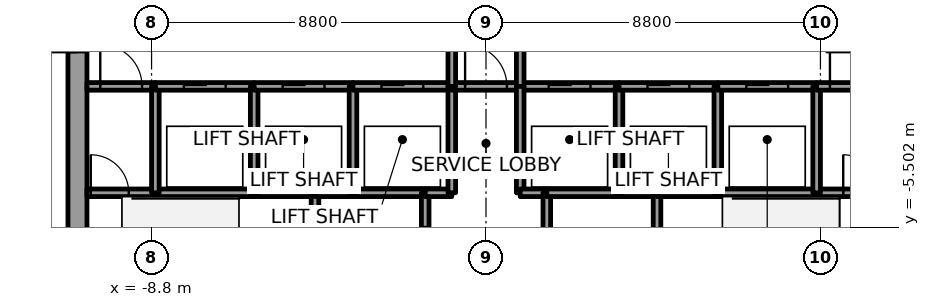
"""IFC4 building model, lengths in metres.
Left out: names, types, materials, properties, quantities, classifications, styles, units other than length and angle.
Written with IfcOpenShell. Run it as: python <this file> out.ifc"""

import sys

from ifc_helpers import new_model, si_unit, direction, frame, frame_2d, origin, place, context, subcontext, project, spatial, rectangle, extrude, element, fill, save


model = new_model("IFC4")
c1 = context("Model", 3, precision=1e-05, world=origin(), true_north=direction((0.0, 1.0)))
c2 = subcontext(c1, "Body", "Model", "MODEL_VIEW")
j1 = project(units=[si_unit("LENGTHUNIT", "METRE"), si_unit("PLANEANGLEUNIT", "RADIAN")], contexts=[c1])
p1 = place(None, origin())
s1 = spatial("IfcSite", under=j1, at=p1, CompositionType="ELEMENT")
p2 = place(p1, origin())
s2 = spatial("IfcBuilding", under=s1, at=p2, CompositionType="ELEMENT")
p3 = place(p2, frame((0.0, 0.0, 92.4)))
s3 = spatial("IfcBuildingStorey", under=s2, at=p3, CompositionType="ELEMENT", Elevation=92.4)
p4 = place(p3, frame((-10.75, -7.5, 0.0), z_axis=(0.0, 0.0, 1.0), x_axis=(0.0, 1.0, 0.0)))
e1 = element("IfcWall", 1, at=p4, inside=s3, PredefinedType="SHEAR", context=c2, shape_type="SweptSolid", body=[
    extrude(rectangle(XDim=15.0, YDim=0.5, at=frame_2d((7.5, 0.0))), origin(), (0.0, 0.0, 1.0), 3.7),
])
p5 = place(p4, frame((6.6, 0.0, 0.0)))
e2 = element("IfcOpeningElement", 2, at=p5, cuts=e1, PredefinedType="OPENING", context=c2, shape_type="SweptSolid", body=[
    extrude(rectangle(XDim=1.8, YDim=2.1, at=frame_2d((0.9, 1.05))), frame((0.0, 0.25, 0.0), z_axis=(0.0, -1.0, 0.0), x_axis=(1.0, 0.0, 0.0)), (0.0, 0.0, 1.0), 0.5),
])
p6 = place(p3, frame((-10.5, -4.6, 0.0), z_axis=(0.0, 0.0, 1.0), x_axis=(1.0, 0.0, 0.0)))
e3 = element("IfcWall", 3, at=p6, inside=s3, PredefinedType="SOLIDWALL", context=c2, shape_type="SweptSolid", body=[
    extrude(rectangle(XDim=1.8, YDim=0.2, at=frame_2d((0.9, 0.0))), origin(), (0.0, 0.0, 1.0), 3.55),
])
p7 = place(p6, frame((0.1, 0.0, 0.0)))
e4 = element("IfcOpeningElement", 4, at=p7, cuts=e3, PredefinedType="OPENING", context=c2, shape_type="SweptSolid", body=[
    extrude(rectangle(XDim=1.0, YDim=2.1, at=frame_2d((0.5, 1.05))), frame((0.0, 0.1, 0.0), z_axis=(0.0, -1.0, 0.0), x_axis=(1.0, 0.0, 0.0)), (0.0, 0.0, 1.0), 0.2),
])
p8 = place(p3, frame((-10.5, -1.8, 0.0), z_axis=(0.0, 0.0, 1.0), x_axis=(1.0, 0.0, 0.0)))
e5 = element("IfcWall", 5, at=p8, inside=s3, PredefinedType="SOLIDWALL", context=c2, shape_type="SweptSolid", body=[
    extrude(rectangle(XDim=1.8, YDim=0.2, at=frame_2d((0.9, 0.0))), origin(), (0.0, 0.0, 1.0), 3.55),
])
p9 = place(p8, frame((0.35, 0.0, 0.0)))
e6 = element("IfcOpeningElement", 6, at=p9, cuts=e5, PredefinedType="OPENING", context=c2, shape_type="SweptSolid", body=[
    extrude(rectangle(XDim=1.1, YDim=2.1, at=frame_2d((0.55, 1.05))), frame((0.0, 0.1, 0.0), z_axis=(0.0, -1.0, 0.0), x_axis=(1.0, 0.0, 0.0)), (0.0, 0.0, 1.0), 0.2),
])
p10 = place(p3, frame((-8.7, -4.6, 0.0), z_axis=(0.0, 0.0, 1.0), x_axis=(1.0, 0.0, 0.0)))
e7 = element("IfcWall", 7, at=p10, inside=s3, PredefinedType="SOLIDWALL", context=c2, shape_type="SweptSolid", body=[
    extrude(rectangle(XDim=2.6, YDim=0.2, at=frame_2d((1.3, 0.0))), origin(), (0.0, 0.0, 1.0), 3.55),
])
p11 = place(p3, frame((-8.7, -4.6, 0.0), z_axis=(0.0, 0.0, 1.0), x_axis=(0.0, 1.0, 0.0)))
e8 = element("IfcWall", 8, at=p11, inside=s3, PredefinedType="SOLIDWALL", context=c2, shape_type="SweptSolid", body=[
    extrude(rectangle(XDim=2.8, YDim=0.2, at=frame_2d((1.4, 0.0))), origin(), (0.0, 0.0, 1.0), 3.55),
])
p12 = place(p3, frame((-8.7, -1.8, 0.0), z_axis=(0.0, 0.0, 1.0), x_axis=(1.0, 0.0, 0.0)))
e9 = element("IfcWall", 9, at=p12, inside=s3, PredefinedType="SOLIDWALL", context=c2, shape_type="SweptSolid", body=[
    extrude(rectangle(XDim=2.6, YDim=0.2, at=frame_2d((1.3, 0.0))), origin(), (0.0, 0.0, 1.0), 3.55),
])
p13 = place(p12, frame((0.75, 0.0, 0.0)))
e10 = element("IfcOpeningElement", 10, at=p13, cuts=e9, PredefinedType="OPENING", context=c2, shape_type="SweptSolid", body=[
    extrude(rectangle(XDim=1.1, YDim=2.1, at=frame_2d((0.55, 1.05))), frame((0.0, 0.1, 0.0), z_axis=(0.0, -1.0, 0.0), x_axis=(1.0, 0.0, 0.0)), (0.0, 0.0, 1.0), 0.2),
])
p14 = place(p3, frame((-6.1, -4.6, 0.0), z_axis=(0.0, 0.0, 1.0), x_axis=(1.0, 0.0, 0.0)))
e11 = element("IfcWall", 11, at=p14, inside=s3, PredefinedType="SOLIDWALL", context=c2, shape_type="SweptSolid", body=[
    extrude(rectangle(XDim=1.6, YDim=0.2, at=frame_2d((0.8, 0.0))), origin(), (0.0, 0.0, 1.0), 3.55),
])
p15 = place(p3, frame((-6.1, -4.6, 0.0), z_axis=(0.0, 0.0, 1.0), x_axis=(0.0, 1.0, 0.0)))
e12 = element("IfcWall", 12, at=p15, inside=s3, PredefinedType="SOLIDWALL", context=c2, shape_type="SweptSolid", body=[
    extrude(rectangle(XDim=2.8, YDim=0.2, at=frame_2d((1.4, 0.0))), origin(), (0.0, 0.0, 1.0), 3.55),
])
p16 = place(p3, frame((-6.1, -1.8, 0.0), z_axis=(0.0, 0.0, 1.0), x_axis=(1.0, 0.0, 0.0)))
e13 = element("IfcWall", 13, at=p16, inside=s3, PredefinedType="SOLIDWALL", context=c2, shape_type="SweptSolid", body=[
    extrude(rectangle(XDim=2.6, YDim=0.2, at=frame_2d((1.3, 0.0))), origin(), (0.0, 0.0, 1.0), 3.55),
])
p17 = place(p16, frame((0.75, 0.0, 0.0)))
e14 = element("IfcOpeningElement", 14, at=p17, cuts=e13, PredefinedType="OPENING", context=c2, shape_type="SweptSolid", body=[
    extrude(rectangle(XDim=1.1, YDim=2.1, at=frame_2d((0.55, 1.05))), frame((0.0, 0.1, 0.0), z_axis=(0.0, -1.0, 0.0), x_axis=(1.0, 0.0, 0.0)), (0.0, 0.0, 1.0), 0.2),
])
p18 = place(p3, frame((-4.5, -4.6, 0.0), z_axis=(0.0, 0.0, 1.0), x_axis=(0.0, -1.0, 0.0)))
e15 = element("IfcWall", 15, at=p18, inside=s3, PredefinedType="SOLIDWALL", context=c2, shape_type="SweptSolid", body=[
    extrude(rectangle(XDim=2.9, YDim=0.2, at=frame_2d((1.45, 0.0))), origin(), (0.0, 0.0, 1.0), 3.55),
])
p19 = place(p3, frame((-4.5, -4.6, 0.0), z_axis=(0.0, 0.0, 1.0), x_axis=(1.0, 0.0, 0.0)))
e16 = element("IfcWall", 16, at=p19, inside=s3, PredefinedType="SOLIDWALL", context=c2, shape_type="SweptSolid", body=[
    extrude(rectangle(XDim=1.0, YDim=0.2, at=frame_2d((0.5, 0.0))), origin(), (0.0, 0.0, 1.0), 3.55),
])
p20 = place(p3, frame((-3.5, -4.6, 0.0), z_axis=(0.0, 0.0, 1.0), x_axis=(1.0, 0.0, 0.0)))
e17 = element("IfcWall", 17, at=p20, inside=s3, PredefinedType="SOLIDWALL", context=c2, shape_type="SweptSolid", body=[
    extrude(rectangle(XDim=1.9, YDim=0.2, at=frame_2d((0.95, 0.0))), origin(), (0.0, 0.0, 1.0), 3.55),
])
p21 = place(p3, frame((-3.5, -4.6, 0.0), z_axis=(0.0, 0.0, 1.0), x_axis=(0.0, 1.0, 0.0)))
e18 = element("IfcWall", 18, at=p21, inside=s3, PredefinedType="SOLIDWALL", context=c2, shape_type="SweptSolid", body=[
    extrude(rectangle(XDim=2.8, YDim=0.2, at=frame_2d((1.4, 0.0))), origin(), (0.0, 0.0, 1.0), 3.55),
])
p22 = place(p3, frame((-3.5, -1.8, 0.0), z_axis=(0.0, 0.0, 1.0), x_axis=(1.0, 0.0, 0.0)))
e19 = element("IfcWall", 19, at=p22, inside=s3, PredefinedType="SOLIDWALL", context=c2, shape_type="SweptSolid", body=[
    extrude(rectangle(XDim=2.6, YDim=0.2, at=frame_2d((1.3, 0.0))), origin(), (0.0, 0.0, 1.0), 3.55),
])
p23 = place(p22, frame((0.75, 0.0, 0.0)))
e20 = element("IfcOpeningElement", 20, at=p23, cuts=e19, PredefinedType="OPENING", context=c2, shape_type="SweptSolid", body=[
    extrude(rectangle(XDim=1.1, YDim=2.1, at=frame_2d((0.55, 1.05))), frame((0.0, 0.1, 0.0), z_axis=(0.0, -1.0, 0.0), x_axis=(1.0, 0.0, 0.0)), (0.0, 0.0, 1.0), 0.2),
])
p24 = place(p3, frame((-1.6, -7.5, 0.0), z_axis=(0.0, 0.0, 1.0), x_axis=(0.0, 1.0, 0.0)))
e21 = element("IfcWall", 21, at=p24, inside=s3, PredefinedType="SOLIDWALL", context=c2, shape_type="SweptSolid", body=[
    extrude(rectangle(XDim=2.9, YDim=0.2, at=frame_2d((1.45, 0.0))), origin(), (0.0, 0.0, 1.0), 3.55),
])
p25 = place(p24, frame((0.9, 0.0, 0.0)))
e22 = element("IfcOpeningElement", 22, at=p25, cuts=e21, PredefinedType="OPENING", context=c2, shape_type="SweptSolid", body=[
    extrude(rectangle(XDim=1.1, YDim=2.1, at=frame_2d((0.55, 1.05))), frame((0.0, 0.1, 0.0), z_axis=(0.0, -1.0, 0.0), x_axis=(1.0, 0.0, 0.0)), (0.0, 0.0, 1.0), 0.2),
])
p26 = place(p3, frame((-1.6, -4.6, 0.0), z_axis=(0.0, 0.0, 1.0), x_axis=(1.0, 0.0, 0.0)))
e23 = element("IfcWall", 23, at=p26, inside=s3, PredefinedType="SOLIDWALL", context=c2, shape_type="SweptSolid", body=[
    extrude(rectangle(XDim=0.7, YDim=0.2, at=frame_2d((0.35, 0.0))), origin(), (0.0, 0.0, 1.0), 3.55),
])
p27 = place(p3, frame((-0.9, -4.6, 0.0), z_axis=(0.0, 0.0, 1.0), x_axis=(0.0, 1.0, 0.0)))
e24 = element("IfcWall", 24, at=p27, inside=s3, PredefinedType="SOLIDWALL", context=c2, shape_type="SweptSolid", body=[
    extrude(rectangle(XDim=2.8, YDim=0.2, at=frame_2d((1.4, 0.0))), origin(), (0.0, 0.0, 1.0), 3.55),
])
p28 = place(p3, frame((-0.9, -1.8, 0.0), z_axis=(0.0, 0.0, 1.0), x_axis=(1.0, 0.0, 0.0)))
e25 = element("IfcWall", 25, at=p28, inside=s3, PredefinedType="SOLIDWALL", context=c2, shape_type="SweptSolid", body=[
    extrude(rectangle(XDim=1.8, YDim=0.2, at=frame_2d((0.9, 0.0))), origin(), (0.0, 0.0, 1.0), 3.55),
])
p29 = place(p28, frame((0.35, 0.0, 0.0)))
e26 = element("IfcOpeningElement", 26, at=p29, cuts=e25, PredefinedType="OPENING", context=c2, shape_type="SweptSolid", body=[
    extrude(rectangle(XDim=1.1, YDim=2.1, at=frame_2d((0.55, 1.05))), frame((0.0, 0.1, 0.0), z_axis=(0.0, -1.0, 0.0), x_axis=(1.0, 0.0, 0.0)), (0.0, 0.0, 1.0), 0.2),
])
p30 = place(p3, frame((-0.9, 1.8, 0.0), z_axis=(0.0, 0.0, 1.0), x_axis=(0.0, -1.0, 0.0)))
e27 = element("IfcWall", 27, at=p30, inside=s3, PredefinedType="SOLIDWALL", context=c2, shape_type="SweptSolid", body=[
    extrude(rectangle(XDim=3.6, YDim=0.2, at=frame_2d((1.8, 0.0))), origin(), (0.0, 0.0, 1.0), 3.55),
])
p31 = place(p30, frame((1.05, 0.0, 0.0)))
e28 = element("IfcOpeningElement", 28, at=p31, cuts=e27, PredefinedType="OPENING", context=c2, shape_type="SweptSolid", body=[
    extrude(rectangle(XDim=1.5, YDim=2.1, at=frame_2d((0.75, 1.05))), frame((0.0, 0.1, 0.0), z_axis=(0.0, -1.0, 0.0), x_axis=(1.0, 0.0, 0.0)), (0.0, 0.0, 1.0), 0.2),
])
p32 = place(p3, frame((0.9, -1.8, 0.0), z_axis=(0.0, 0.0, 1.0), x_axis=(1.0, 0.0, 0.0)))
e29 = element("IfcWall", 29, at=p32, inside=s3, PredefinedType="SOLIDWALL", context=c2, shape_type="SweptSolid", body=[
    extrude(rectangle(XDim=2.6, YDim=0.2, at=frame_2d((1.3, 0.0))), origin(), (0.0, 0.0, 1.0), 3.55),
])
p33 = place(p32, frame((0.75, 0.0, 0.0)))
e30 = element("IfcOpeningElement", 30, at=p33, cuts=e29, PredefinedType="OPENING", context=c2, shape_type="SweptSolid", body=[
    extrude(rectangle(XDim=1.1, YDim=2.1, at=frame_2d((0.55, 1.05))), frame((0.0, 0.1, 0.0), z_axis=(0.0, -1.0, 0.0), x_axis=(1.0, 0.0, 0.0)), (0.0, 0.0, 1.0), 0.2),
])
p34 = place(p3, frame((0.9, -1.8, 0.0), z_axis=(0.0, 0.0, 1.0), x_axis=(0.0, 1.0, 0.0)))
e31 = element("IfcWall", 31, at=p34, inside=s3, PredefinedType="SOLIDWALL", context=c2, shape_type="SweptSolid", body=[
    extrude(rectangle(XDim=3.6, YDim=0.2, at=frame_2d((1.8, 0.0))), origin(), (0.0, 0.0, 1.0), 3.55),
])
p35 = place(p34, frame((1.05, 0.0, 0.0)))
e32 = element("IfcOpeningElement", 32, at=p35, cuts=e31, PredefinedType="OPENING", context=c2, shape_type="SweptSolid", body=[
    extrude(rectangle(XDim=1.5, YDim=2.1, at=frame_2d((0.75, 1.05))), frame((0.0, 0.1, 0.0), z_axis=(0.0, -1.0, 0.0), x_axis=(1.0, 0.0, 0.0)), (0.0, 0.0, 1.0), 0.2),
])
p36 = place(p3, frame((0.9, -1.8, 0.0), z_axis=(0.0, 0.0, 1.0), x_axis=(0.0, -1.0, 0.0)))
e33 = element("IfcWall", 33, at=p36, inside=s3, PredefinedType="SOLIDWALL", context=c2, shape_type="SweptSolid", body=[
    extrude(rectangle(XDim=2.8, YDim=0.2, at=frame_2d((1.4, 0.0))), origin(), (0.0, 0.0, 1.0), 3.55),
])
p37 = place(p3, frame((0.9, -4.6, 0.0), z_axis=(0.0, 0.0, 1.0), x_axis=(1.0, 0.0, 0.0)))
e34 = element("IfcWall", 34, at=p37, inside=s3, PredefinedType="SOLIDWALL", context=c2, shape_type="SweptSolid", body=[
    extrude(rectangle(XDim=0.7, YDim=0.2, at=frame_2d((0.35, 0.0))), origin(), (0.0, 0.0, 1.0), 3.55),
])
p38 = place(p3, frame((1.6, -4.6, 0.0), z_axis=(0.0, 0.0, 1.0), x_axis=(0.0, -1.0, 0.0)))
e35 = element("IfcWall", 35, at=p38, inside=s3, PredefinedType="SOLIDWALL", context=c2, shape_type="SweptSolid", body=[
    extrude(rectangle(XDim=2.9, YDim=0.2, at=frame_2d((1.45, 0.0))), origin(), (0.0, 0.0, 1.0), 3.55),
])
p39 = place(p38, frame((1.0, 0.0, 0.0)))
e36 = element("IfcOpeningElement", 36, at=p39, cuts=e35, PredefinedType="OPENING", context=c2, shape_type="SweptSolid", body=[
    extrude(rectangle(XDim=0.9, YDim=2.1, at=frame_2d((0.45, 1.05))), frame((0.0, 0.1, 0.0), z_axis=(0.0, -1.0, 0.0), x_axis=(1.0, 0.0, 0.0)), (0.0, 0.0, 1.0), 0.2),
])
p40 = place(p3, frame((3.5, -4.6, 0.0), z_axis=(0.0, 0.0, 1.0), x_axis=(-1.0, 0.0, 0.0)))
e37 = element("IfcWall", 37, at=p40, inside=s3, PredefinedType="SOLIDWALL", context=c2, shape_type="SweptSolid", body=[
    extrude(rectangle(XDim=1.9, YDim=0.2, at=frame_2d((0.95, 0.0))), origin(), (0.0, 0.0, 1.0), 3.55),
])
p41 = place(p3, frame((4.5, -4.6, 0.0), z_axis=(0.0, 0.0, 1.0), x_axis=(-1.0, 0.0, 0.0)))
e38 = element("IfcWall", 38, at=p41, inside=s3, PredefinedType="SOLIDWALL", context=c2, shape_type="SweptSolid", body=[
    extrude(rectangle(XDim=1.0, YDim=0.2, at=frame_2d((0.5, 0.0))), origin(), (0.0, 0.0, 1.0), 3.55),
])
p42 = place(p3, frame((3.5, -4.6, 0.0), z_axis=(0.0, 0.0, 1.0), x_axis=(0.0, 1.0, 0.0)))
e39 = element("IfcWall", 39, at=p42, inside=s3, PredefinedType="SOLIDWALL", context=c2, shape_type="SweptSolid", body=[
    extrude(rectangle(XDim=2.8, YDim=0.2, at=frame_2d((1.4, 0.0))), origin(), (0.0, 0.0, 1.0), 3.55),
])
p43 = place(p3, frame((3.5, -1.8, 0.0), z_axis=(0.0, 0.0, 1.0), x_axis=(1.0, 0.0, 0.0)))
e40 = element("IfcWall", 40, at=p43, inside=s3, PredefinedType="SOLIDWALL", context=c2, shape_type="SweptSolid", body=[
    extrude(rectangle(XDim=2.6, YDim=0.2, at=frame_2d((1.3, 0.0))), origin(), (0.0, 0.0, 1.0), 3.55),
])
p44 = place(p43, frame((0.75, 0.0, 0.0)))
e41 = element("IfcOpeningElement", 41, at=p44, cuts=e40, PredefinedType="OPENING", context=c2, shape_type="SweptSolid", body=[
    extrude(rectangle(XDim=1.1, YDim=2.1, at=frame_2d((0.55, 1.05))), frame((0.0, 0.1, 0.0), z_axis=(0.0, -1.0, 0.0), x_axis=(1.0, 0.0, 0.0)), (0.0, 0.0, 1.0), 0.2),
])
p45 = place(p3, frame((4.5, -7.5, 0.0), z_axis=(0.0, 0.0, 1.0), x_axis=(0.0, 1.0, 0.0)))
e42 = element("IfcWall", 42, at=p45, inside=s3, PredefinedType="SOLIDWALL", context=c2, shape_type="SweptSolid", body=[
    extrude(rectangle(XDim=2.9, YDim=0.2, at=frame_2d((1.45, 0.0))), origin(), (0.0, 0.0, 1.0), 3.55),
])
p46 = place(p3, frame((4.5, -4.6, 0.0), z_axis=(0.0, 0.0, 1.0), x_axis=(1.0, 0.0, 0.0)))
e43 = element("IfcWall", 43, at=p46, inside=s3, PredefinedType="SOLIDWALL", context=c2, shape_type="SweptSolid", body=[
    extrude(rectangle(XDim=1.6, YDim=0.2, at=frame_2d((0.8, 0.0))), origin(), (0.0, 0.0, 1.0), 3.55),
])
p47 = place(p3, frame((6.1, -4.6, 0.0), z_axis=(0.0, 0.0, 1.0), x_axis=(1.0, 0.0, 0.0)))
e44 = element("IfcWall", 44, at=p47, inside=s3, PredefinedType="SOLIDWALL", context=c2, shape_type="SweptSolid", body=[
    extrude(rectangle(XDim=2.6, YDim=0.2, at=frame_2d((1.3, 0.0))), origin(), (0.0, 0.0, 1.0), 3.55),
])
p48 = place(p3, frame((6.1, -4.6, 0.0), z_axis=(0.0, 0.0, 1.0), x_axis=(0.0, 1.0, 0.0)))
e45 = element("IfcWall", 45, at=p48, inside=s3, PredefinedType="SOLIDWALL", context=c2, shape_type="SweptSolid", body=[
    extrude(rectangle(XDim=2.8, YDim=0.2, at=frame_2d((1.4, 0.0))), origin(), (0.0, 0.0, 1.0), 3.55),
])
p49 = place(p3, frame((6.1, -1.8, 0.0), z_axis=(0.0, 0.0, 1.0), x_axis=(1.0, 0.0, 0.0)))
e46 = element("IfcWall", 46, at=p49, inside=s3, PredefinedType="SOLIDWALL", context=c2, shape_type="SweptSolid", body=[
    extrude(rectangle(XDim=2.6, YDim=0.2, at=frame_2d((1.3, 0.0))), origin(), (0.0, 0.0, 1.0), 3.55),
])
p50 = place(p49, frame((0.75, 0.0, 0.0)))
e47 = element("IfcOpeningElement", 47, at=p50, cuts=e46, PredefinedType="OPENING", context=c2, shape_type="SweptSolid", body=[
    extrude(rectangle(XDim=1.1, YDim=2.1, at=frame_2d((0.55, 1.05))), frame((0.0, 0.1, 0.0), z_axis=(0.0, -1.0, 0.0), x_axis=(1.0, 0.0, 0.0)), (0.0, 0.0, 1.0), 0.2),
])
p51 = place(p3, frame((8.7, -4.6, 0.0), z_axis=(0.0, 0.0, 1.0), x_axis=(1.0, 0.0, 0.0)))
e48 = element("IfcWall", 48, at=p51, inside=s3, PredefinedType="SOLIDWALL", context=c2, shape_type="SweptSolid", body=[
    extrude(rectangle(XDim=1.8, YDim=0.2, at=frame_2d((0.9, 0.0))), origin(), (0.0, 0.0, 1.0), 3.55),
])
p52 = place(p51, frame((0.7, 0.0, 0.0)))
e49 = element("IfcOpeningElement", 49, at=p52, cuts=e48, PredefinedType="OPENING", context=c2, shape_type="SweptSolid", body=[
    extrude(rectangle(XDim=1.0, YDim=2.1, at=frame_2d((0.5, 1.05))), frame((0.0, 0.1, 0.0), z_axis=(0.0, -1.0, 0.0), x_axis=(1.0, 0.0, 0.0)), (0.0, 0.0, 1.0), 0.2),
])
p53 = place(p3, frame((8.7, -1.8, 0.0), z_axis=(0.0, 0.0, 1.0), x_axis=(0.0, -1.0, 0.0)))
e50 = element("IfcWall", 50, at=p53, inside=s3, PredefinedType="SOLIDWALL", context=c2, shape_type="SweptSolid", body=[
    extrude(rectangle(XDim=2.8, YDim=0.2, at=frame_2d((1.4, 0.0))), origin(), (0.0, 0.0, 1.0), 3.55),
])
p54 = place(p3, frame((8.7, -1.8, 0.0), z_axis=(0.0, 0.0, 1.0), x_axis=(1.0, 0.0, 0.0)))
e51 = element("IfcWall", 51, at=p54, inside=s3, PredefinedType="SOLIDWALL", context=c2, shape_type="SweptSolid", body=[
    extrude(rectangle(XDim=1.8, YDim=0.2, at=frame_2d((0.9, 0.0))), origin(), (0.0, 0.0, 1.0), 3.55),
])
p55 = place(p54, frame((0.35, 0.0, 0.0)))
e52 = element("IfcOpeningElement", 52, at=p55, cuts=e51, PredefinedType="OPENING", context=c2, shape_type="SweptSolid", body=[
    extrude(rectangle(XDim=1.1, YDim=2.1, at=frame_2d((0.55, 1.05))), frame((0.0, 0.1, 0.0), z_axis=(0.0, -1.0, 0.0), x_axis=(1.0, 0.0, 0.0)), (0.0, 0.0, 1.0), 0.2),
])
p56 = place(p13, origin())
e53 = element("IfcDoor", 53, at=p56, inside=s3, OperationType="SLIDING_TO_LEFT", PredefinedType="DOOR", context=c2, shape_type="SweptSolid", body=[
    extrude(rectangle(XDim=1.1, YDim=2.1, at=frame_2d((0.55, 1.05))), frame((0.0, 0.025, 0.0), z_axis=(0.0, -1.0, 0.0), x_axis=(1.0, 0.0, 0.0)), (0.0, 0.0, 1.0), 0.05),
])
fill(e10, e53)
p57 = place(p17, origin())
e54 = element("IfcDoor", 54, at=p57, inside=s3, OperationType="SLIDING_TO_LEFT", PredefinedType="DOOR", context=c2, shape_type="SweptSolid", body=[
    extrude(rectangle(XDim=1.1, YDim=2.1, at=frame_2d((0.55, 1.05))), frame((0.0, 0.025, 0.0), z_axis=(0.0, -1.0, 0.0), x_axis=(1.0, 0.0, 0.0)), (0.0, 0.0, 1.0), 0.05),
])
fill(e14, e54)
p58 = place(p23, origin())
e55 = element("IfcDoor", 55, at=p58, inside=s3, OperationType="SLIDING_TO_LEFT", PredefinedType="DOOR", context=c2, shape_type="SweptSolid", body=[
    extrude(rectangle(XDim=1.1, YDim=2.1, at=frame_2d((0.55, 1.05))), frame((0.0, 0.025, 0.0), z_axis=(0.0, -1.0, 0.0), x_axis=(1.0, 0.0, 0.0)), (0.0, 0.0, 1.0), 0.05),
])
fill(e20, e55)
p59 = place(p33, origin())
e56 = element("IfcDoor", 56, at=p59, inside=s3, OperationType="SLIDING_TO_RIGHT", PredefinedType="DOOR", context=c2, shape_type="SweptSolid", body=[
    extrude(rectangle(XDim=1.1, YDim=2.1, at=frame_2d((0.55, 1.05))), frame((0.0, 0.025, 0.0), z_axis=(0.0, -1.0, 0.0), x_axis=(1.0, 0.0, 0.0)), (0.0, 0.0, 1.0), 0.05),
])
fill(e30, e56)
p60 = place(p44, origin())
e57 = element("IfcDoor", 57, at=p60, inside=s3, OperationType="SLIDING_TO_RIGHT", PredefinedType="DOOR", context=c2, shape_type="SweptSolid", body=[
    extrude(rectangle(XDim=1.1, YDim=2.1, at=frame_2d((0.55, 1.05))), frame((0.0, 0.025, 0.0), z_axis=(0.0, -1.0, 0.0), x_axis=(1.0, 0.0, 0.0)), (0.0, 0.0, 1.0), 0.05),
])
fill(e41, e57)
p61 = place(p50, origin())
e58 = element("IfcDoor", 58, at=p61, inside=s3, OperationType="SLIDING_TO_LEFT", PredefinedType="DOOR", context=c2, shape_type="SweptSolid", body=[
    extrude(rectangle(XDim=1.1, YDim=2.1, at=frame_2d((0.55, 1.05))), frame((0.0, 0.025, 0.0), z_axis=(0.0, -1.0, 0.0), x_axis=(1.0, 0.0, 0.0)), (0.0, 0.0, 1.0), 0.05),
])
fill(e47, e58)
p62 = place(p9, origin())
e59 = element("IfcDoor", 59, at=p62, inside=s3, OperationType="SINGLE_SWING_LEFT", PredefinedType="DOOR", context=c2, shape_type="SweptSolid", body=[
    extrude(rectangle(XDim=1.1, YDim=2.1, at=frame_2d((0.55, 1.05))), frame((0.0, 0.025, 0.0), z_axis=(0.0, -1.0, 0.0), x_axis=(1.0, 0.0, 0.0)), (0.0, 0.0, 1.0), 0.05),
])
fill(e6, e59)
p63 = place(p55, origin())
e60 = element("IfcDoor", 60, at=p63, inside=s3, OperationType="SINGLE_SWING_RIGHT", PredefinedType="DOOR", context=c2, shape_type="SweptSolid", body=[
    extrude(rectangle(XDim=1.1, YDim=2.1, at=frame_2d((0.55, 1.05))), frame((0.0, 0.025, 0.0), z_axis=(0.0, -1.0, 0.0), x_axis=(1.0, 0.0, 0.0)), (0.0, 0.0, 1.0), 0.05),
])
fill(e52, e60)
p64 = place(p29, origin())
e61 = element("IfcDoor", 61, at=p64, inside=s3, OperationType="SINGLE_SWING_RIGHT", PredefinedType="DOOR", context=c2, shape_type="SweptSolid", body=[
    extrude(rectangle(XDim=1.1, YDim=2.1, at=frame_2d((0.55, 1.05))), frame((0.0, 0.025, 0.0), z_axis=(0.0, -1.0, 0.0), x_axis=(1.0, 0.0, 0.0)), (0.0, 0.0, 1.0), 0.05),
])
fill(e26, e61)
p65 = place(p7, origin())
e62 = element("IfcDoor", 62, at=p65, inside=s3, OperationType="SINGLE_SWING_LEFT", PredefinedType="DOOR", context=c2, shape_type="SweptSolid", body=[
    extrude(rectangle(XDim=1.0, YDim=2.1, at=frame_2d((0.5, 1.05))), frame((0.0, 0.025, 0.0), z_axis=(0.0, -1.0, 0.0), x_axis=(1.0, 0.0, 0.0)), (0.0, 0.0, 1.0), 0.05),
])
fill(e4, e62)
p66 = place(p52, origin())
e63 = element("IfcDoor", 63, at=p66, inside=s3, OperationType="SINGLE_SWING_RIGHT", PredefinedType="DOOR", context=c2, shape_type="SweptSolid", body=[
    extrude(rectangle(XDim=1.0, YDim=2.1, at=frame_2d((0.5, 1.05))), frame((0.0, 0.025, 0.0), z_axis=(0.0, -1.0, 0.0), x_axis=(1.0, 0.0, 0.0)), (0.0, 0.0, 1.0), 0.05),
])
fill(e49, e63)
p67 = place(p5, origin())
e64 = element("IfcDoor", 64, at=p67, inside=s3, OperationType="DOUBLE_DOOR_SINGLE_SWING", PredefinedType="DOOR", context=c2, shape_type="SweptSolid", body=[
    extrude(rectangle(XDim=1.8, YDim=2.1, at=frame_2d((0.9, 1.05))), frame((0.0, 0.025, 0.0), z_axis=(0.0, -1.0, 0.0), x_axis=(1.0, 0.0, 0.0)), (0.0, 0.0, 1.0), 0.05),
])
fill(e2, e64)
save(model, sys.argv[1])
